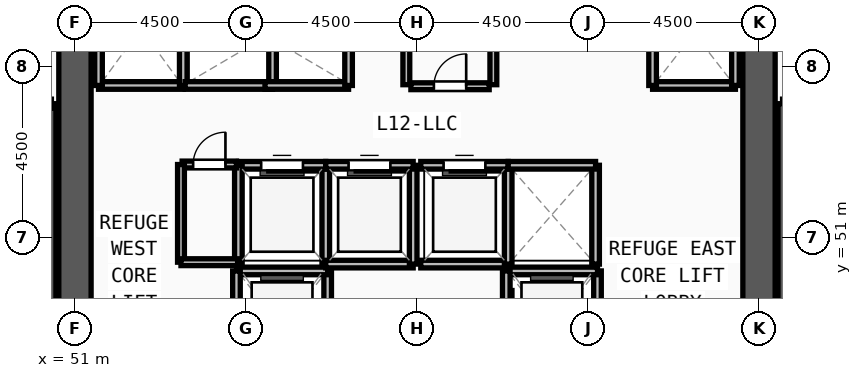
"""IFC4 building model, lengths in metres.
Left out: names, types, materials, properties, quantities, classifications, styles, units other than length and angle.
Written with IfcOpenShell. Run it as: python <this file> out.ifc"""

import sys

from ifc_helpers import new_model, si_unit, direction, frame, frame_2d, origin, place, context, subcontext, project, spatial, rectangle, extrude, source, transform, mapped, element, fill, save


model = new_model("IFC4")
c1 = context("Model", 3, precision=1e-05, world=origin(), true_north=direction((0.0, 1.0)))
c2 = subcontext(c1, "Body", "Model", "MODEL_VIEW")
j1 = project(units=[si_unit("LENGTHUNIT", "METRE"), si_unit("PLANEANGLEUNIT", "RADIAN")], contexts=[c1])
p1 = place(None, origin())
s1 = spatial("IfcSite", under=j1, at=p1, CompositionType="ELEMENT")
p2 = place(p1, origin())
s2 = spatial("IfcBuilding", under=s1, at=p2, CompositionType="ELEMENT")
p3 = place(p2, frame((0.0, 0.0, 47.25)))
s3 = spatial("IfcBuildingStorey", under=s2, at=p3, CompositionType="ELEMENT", Elevation=47.25)
p4 = place(p3, frame((69.0, 60.675, 0.0), z_axis=(0.0, 0.0, 1.0), x_axis=(0.0, -1.0, 0.0)))
e1 = element("IfcWall", 1, at=p4, inside=s3, PredefinedType="SHEAR", context=c2, shape_type="SweptSolid", body=[
    extrude(rectangle(XDim=13.35, YDim=0.85, at=frame_2d((6.675, 0.0))), origin(), (0.0, 0.0, 1.0), 4.32),
])
m1 = source(origin(), c2, "Body", "SweptSolid", [
    extrude(rectangle(XDim=1.2, YDim=2.2, at=frame_2d((0.6, 1.1))), frame((0.0, 0.435, 0.0), z_axis=(0.0, -1.0, 0.0), x_axis=(1.0, 0.0, 0.0)), (0.0, 0.0, 1.0), 0.87),
])
p5 = place(p4, frame((1.125, 0.0, 0.0)))
e2 = element("IfcOpeningElement", 2, at=p5, cuts=e1, PredefinedType="OPENING", context=c2, shape_type="MappedRepresentation", body=[
    mapped(m1, transform((0.0, 0.0, 0.0), x_axis=(1.0, 0.0, 0.0), y_axis=(0.0, 1.0, 0.0), z_axis=(0.0, 0.0, 1.0), scale=1.0)),
])
p6 = place(p3, frame((51.0, 47.325, 0.0), z_axis=(0.0, 0.0, 1.0), x_axis=(0.0, 1.0, 0.0)))
e3 = element("IfcWall", 3, at=p6, inside=s3, PredefinedType="SHEAR", context=c2, shape_type="SweptSolid", body=[
    extrude(rectangle(XDim=13.35, YDim=0.85, at=frame_2d((6.675, 0.0))), origin(), (0.0, 0.0, 1.0), 4.32),
])
for number, where, z_axis, x_axis in (
    (4, (50.38, 46.7, 0.0), (0.0, 0.0, 1.0), (0.0, 1.0, 0.0)),
    (5, (69.62, 54.52, 0.0), (0.0, 0.0, 1.0), (0.0, -1.0, 0.0)),
):
    element("IfcWall", number, at=place(p3, frame(where, z_axis=z_axis, x_axis=x_axis)), inside=s3, PredefinedType="SOLIDWALL", context=c2, shape_type="SweptSolid", body=[
        extrude(rectangle(XDim=7.82, YDim=0.24, at=frame_2d((3.91, 0.0))), origin(), (0.0, 0.0, 1.0), 4.32),
    ])
p7 = place(p3, frame((57.65, 47.12, 0.0), z_axis=(0.0, 0.0, 1.0), x_axis=(0.0, 1.0, 0.0)))
e6 = element("IfcWall", 6, at=p7, inside=s3, PredefinedType="SOLIDWALL", context=c2, shape_type="SweptSolid", body=[
    extrude(rectangle(XDim=3.0, YDim=0.2, at=frame_2d((1.5, 0.0))), origin(), (0.0, 0.0, 1.0), 4.32),
])
m2 = source(origin(), c2, "Body", "SweptSolid", [
    extrude(rectangle(XDim=1.2, YDim=2.3, at=frame_2d((0.6, 1.15))), frame((0.0, 0.11, 0.0), z_axis=(0.0, -1.0, 0.0), x_axis=(1.0, 0.0, 0.0)), (0.0, 0.0, 1.0), 0.22),
])
p8 = place(p7, frame((0.9, 0.0, 0.0)))
e7 = element("IfcOpeningElement", 7, at=p8, cuts=e6, PredefinedType="OPENING", context=c2, shape_type="MappedRepresentation", body=[
    mapped(m2, transform((0.0, 0.0, 0.0), x_axis=(1.0, 0.0, 0.0), y_axis=(0.0, 1.0, 0.0), z_axis=(0.0, 0.0, 1.0), scale=1.0)),
])
p9 = place(p3, frame((57.65, 50.12, 0.0), z_axis=(0.0, 0.0, 1.0), x_axis=(-1.0, 0.0, 0.0)))
e8 = element("IfcWall", 8, at=p9, inside=s3, PredefinedType="SOLIDWALL", context=c2, shape_type="SweptSolid", body=[
    extrude(rectangle(XDim=2.4, YDim=0.2, at=frame_2d((1.2, 0.0))), origin(), (0.0, 0.0, 1.0), 4.32),
])
for number, where, z_axis, x_axis in (
    (9, (55.25, 50.12, 0.0), (0.0, 0.0, 1.0), (0.0, -1.0, 0.0)),
    (10, (64.75, 47.12, 0.0), (0.0, 0.0, 1.0), (0.0, 1.0, 0.0)),
):
    element("IfcWall", number, at=place(p3, frame(where, z_axis=z_axis, x_axis=x_axis)), inside=s3, PredefinedType="SOLIDWALL", context=c2, shape_type="SweptSolid", body=[
        extrude(rectangle(XDim=3.0, YDim=0.2, at=frame_2d((1.5, 0.0))), origin(), (0.0, 0.0, 1.0), 4.32),
    ])
p10 = place(p3, frame((64.75, 50.12, 0.0), z_axis=(0.0, 0.0, 1.0), x_axis=(-1.0, 0.0, 0.0)))
e11 = element("IfcWall", 11, at=p10, inside=s3, PredefinedType="SOLIDWALL", context=c2, shape_type="SweptSolid", body=[
    extrude(rectangle(XDim=2.4, YDim=0.2, at=frame_2d((1.2, 0.0))), origin(), (0.0, 0.0, 1.0), 4.32),
])
p11 = place(p3, frame((62.35, 50.12, 0.0), z_axis=(0.0, 0.0, 1.0), x_axis=(0.0, -1.0, 0.0)))
e12 = element("IfcWall", 12, at=p11, inside=s3, PredefinedType="SOLIDWALL", context=c2, shape_type="SweptSolid", body=[
    extrude(rectangle(XDim=3.0, YDim=0.2, at=frame_2d((1.5, 0.0))), origin(), (0.0, 0.0, 1.0), 4.32),
])
p12 = place(p11, frame((0.9, 0.0, 0.0)))
e13 = element("IfcOpeningElement", 13, at=p12, cuts=e12, PredefinedType="OPENING", context=c2, shape_type="MappedRepresentation", body=[
    mapped(m2, transform((0.0, 0.0, 0.0), x_axis=(1.0, 0.0, 0.0), y_axis=(0.0, 1.0, 0.0), z_axis=(0.0, 0.0, 1.0), scale=1.0)),
])
p13 = place(p3, frame((51.62, 55.0, 0.0), z_axis=(0.0, 0.0, 1.0), x_axis=(1.0, 0.0, 0.0)))
e14 = element("IfcWall", 14, at=p13, inside=s3, PredefinedType="SOLIDWALL", context=c2, shape_type="SweptSolid", body=[
    extrude(rectangle(XDim=2.23, YDim=0.2, at=frame_2d((1.115, 0.0))), origin(), (0.0, 0.0, 1.0), 4.32),
])
for number, where, z_axis, x_axis in (
    (15, (53.85, 55.0, 0.0), (0.0, 0.0, 1.0), (0.0, 1.0, 0.0)),
    (16, (51.62, 58.0, 0.0), (0.0, 0.0, 1.0), (0.0, -1.0, 0.0)),
):
    element("IfcWall", number, at=place(p3, frame(where, z_axis=z_axis, x_axis=x_axis)), inside=s3, PredefinedType="SOLIDWALL", context=c2, shape_type="SweptSolid", body=[
        extrude(rectangle(XDim=3.0, YDim=0.2, at=frame_2d((1.5, 0.0))), origin(), (0.0, 0.0, 1.0), 4.32),
    ])
p14 = place(p3, frame((66.2, 55.0, 0.0), z_axis=(0.0, 0.0, 1.0), x_axis=(1.0, 0.0, 0.0)))
e17 = element("IfcWall", 17, at=p14, inside=s3, PredefinedType="SOLIDWALL", context=c2, shape_type="SweptSolid", body=[
    extrude(rectangle(XDim=2.18, YDim=0.2, at=frame_2d((1.09, 0.0))), origin(), (0.0, 0.0, 1.0), 4.32),
])
for number, where, z_axis, x_axis in (
    (18, (68.38, 55.0, 0.0), (0.0, 0.0, 1.0), (0.0, 1.0, 0.0)),
    (19, (66.2, 57.75, 0.0), (0.0, 0.0, 1.0), (0.0, -1.0, 0.0)),
):
    element("IfcWall", number, at=place(p3, frame(where, z_axis=z_axis, x_axis=x_axis)), inside=s3, PredefinedType="SOLIDWALL", context=c2, shape_type="SweptSolid", body=[
        extrude(rectangle(XDim=2.75, YDim=0.2, at=frame_2d((1.375, 0.0))), origin(), (0.0, 0.0, 1.0), 4.32),
    ])
p15 = place(p3, frame((57.6, 50.3, 0.0), z_axis=(0.0, 0.0, 1.0), x_axis=(0.0, 1.0, 0.0)))
e20 = element("IfcWall", 20, at=p15, inside=s3, PredefinedType="SOLIDWALL", context=c2, shape_type="SweptSolid", body=[
    extrude(rectangle(XDim=2.6, YDim=0.2, at=frame_2d((1.3, 0.0))), origin(), (0.0, 0.0, 1.0), 4.32),
])
p16 = place(p3, frame((57.6, 52.9, 0.0), z_axis=(0.0, 0.0, 1.0), x_axis=(-1.0, 0.0, 0.0)))
e21 = element("IfcWall", 21, at=p16, inside=s3, PredefinedType="SOLIDWALL", context=c2, shape_type="SweptSolid", body=[
    extrude(rectangle(XDim=2.3, YDim=0.2, at=frame_2d((1.15, 0.0))), origin(), (0.0, 0.0, 1.0), 4.32),
])
m3 = source(origin(), c2, "Body", "SweptSolid", [
    extrude(rectangle(XDim=1.1, YDim=2.2, at=frame_2d((0.55, 1.1))), frame((0.0, 0.11, 0.0), z_axis=(0.0, -1.0, 0.0), x_axis=(1.0, 0.0, 0.0)), (0.0, 0.0, 1.0), 0.22),
])
p17 = place(p16, frame((0.6, 0.0, 0.0)))
e22 = element("IfcOpeningElement", 22, at=p17, cuts=e21, PredefinedType="OPENING", context=c2, shape_type="MappedRepresentation", body=[
    mapped(m3, transform((0.0, 0.0, 0.0), x_axis=(1.0, 0.0, 0.0), y_axis=(0.0, 1.0, 0.0), z_axis=(0.0, 0.0, 1.0), scale=1.0)),
])
p18 = place(p3, frame((55.3, 52.9, 0.0), z_axis=(0.0, 0.0, 1.0), x_axis=(0.0, -1.0, 0.0)))
e23 = element("IfcWall", 23, at=p18, inside=s3, PredefinedType="SOLIDWALL", context=c2, shape_type="SweptSolid", body=[
    extrude(rectangle(XDim=2.6, YDim=0.2, at=frame_2d((1.3, 0.0))), origin(), (0.0, 0.0, 1.0), 4.32),
])
p19 = place(p3, frame((57.6, 50.3, 0.0), z_axis=(0.0, 0.0, 1.0), x_axis=(1.0, 0.0, 0.0)))
e24 = element("IfcWall", 24, at=p19, inside=s3, PredefinedType="SOLIDWALL", context=c2, shape_type="SweptSolid", body=[
    extrude(rectangle(XDim=2.3, YDim=0.2, at=frame_2d((1.15, 0.0))), origin(), (0.0, 0.0, 1.0), 4.32),
])
p20 = place(p3, frame((59.9, 50.3, 0.0), z_axis=(0.0, 0.0, 1.0), x_axis=(0.0, 1.0, 0.0)))
e25 = element("IfcWall", 25, at=p20, inside=s3, PredefinedType="SOLIDWALL", context=c2, shape_type="SweptSolid", body=[
    extrude(rectangle(XDim=2.6, YDim=0.2, at=frame_2d((1.3, 0.0))), origin(), (0.0, 0.0, 1.0), 4.32),
])
p21 = place(p3, frame((59.9, 52.9, 0.0), z_axis=(0.0, 0.0, 1.0), x_axis=(-1.0, 0.0, 0.0)))
e26 = element("IfcWall", 26, at=p21, inside=s3, PredefinedType="SOLIDWALL", context=c2, shape_type="SweptSolid", body=[
    extrude(rectangle(XDim=2.3, YDim=0.2, at=frame_2d((1.15, 0.0))), origin(), (0.0, 0.0, 1.0), 4.32),
])
p22 = place(p21, frame((0.6, 0.0, 0.0)))
e27 = element("IfcOpeningElement", 27, at=p22, cuts=e26, PredefinedType="OPENING", context=c2, shape_type="MappedRepresentation", body=[
    mapped(m3, transform((0.0, 0.0, 0.0), x_axis=(1.0, 0.0, 0.0), y_axis=(0.0, 1.0, 0.0), z_axis=(0.0, 0.0, 1.0), scale=1.0)),
])
p23 = place(p3, frame((60.1, 50.3, 0.0), z_axis=(0.0, 0.0, 1.0), x_axis=(1.0, 0.0, 0.0)))
e28 = element("IfcWall", 28, at=p23, inside=s3, PredefinedType="SOLIDWALL", context=c2, shape_type="SweptSolid", body=[
    extrude(rectangle(XDim=2.3, YDim=0.2, at=frame_2d((1.15, 0.0))), origin(), (0.0, 0.0, 1.0), 4.32),
])
p24 = place(p3, frame((62.4, 50.3, 0.0), z_axis=(0.0, 0.0, 1.0), x_axis=(0.0, 1.0, 0.0)))
e29 = element("IfcWall", 29, at=p24, inside=s3, PredefinedType="SOLIDWALL", context=c2, shape_type="SweptSolid", body=[
    extrude(rectangle(XDim=2.6, YDim=0.2, at=frame_2d((1.3, 0.0))), origin(), (0.0, 0.0, 1.0), 4.32),
])
p25 = place(p3, frame((62.4, 52.9, 0.0), z_axis=(0.0, 0.0, 1.0), x_axis=(-1.0, 0.0, 0.0)))
e30 = element("IfcWall", 30, at=p25, inside=s3, PredefinedType="SOLIDWALL", context=c2, shape_type="SweptSolid", body=[
    extrude(rectangle(XDim=2.3, YDim=0.2, at=frame_2d((1.15, 0.0))), origin(), (0.0, 0.0, 1.0), 4.32),
])
p26 = place(p25, frame((0.6, 0.0, 0.0)))
e31 = element("IfcOpeningElement", 31, at=p26, cuts=e30, PredefinedType="OPENING", context=c2, shape_type="MappedRepresentation", body=[
    mapped(m3, transform((0.0, 0.0, 0.0), x_axis=(1.0, 0.0, 0.0), y_axis=(0.0, 1.0, 0.0), z_axis=(0.0, 0.0, 1.0), scale=1.0)),
])
p27 = place(p3, frame((64.7, 50.3, 0.0), z_axis=(0.0, 0.0, 1.0), x_axis=(0.0, 1.0, 0.0)))
e32 = element("IfcWall", 32, at=p27, inside=s3, PredefinedType="SOLIDWALL", context=c2, shape_type="SweptSolid", body=[
    extrude(rectangle(XDim=2.6, YDim=0.2, at=frame_2d((1.3, 0.0))), origin(), (0.0, 0.0, 1.0), 4.32),
])
for number, where, z_axis, x_axis in (
    (33, (64.7, 52.9, 0.0), (0.0, 0.0, 1.0), (-1.0, 0.0, 0.0)),
    (34, (53.9, 55.0, 0.0), (0.0, 0.0, 1.0), (1.0, 0.0, 0.0)),
):
    element("IfcWall", number, at=place(p3, frame(where, z_axis=z_axis, x_axis=x_axis)), inside=s3, PredefinedType="SOLIDWALL", context=c2, shape_type="SweptSolid", body=[
        extrude(rectangle(XDim=2.3, YDim=0.2, at=frame_2d((1.15, 0.0))), origin(), (0.0, 0.0, 1.0), 4.32),
    ])
p28 = place(p3, frame((56.2, 55.0, 0.0), z_axis=(0.0, 0.0, 1.0), x_axis=(0.0, 1.0, 0.0)))
e35 = element("IfcWall", 35, at=p28, inside=s3, PredefinedType="SOLIDWALL", context=c2, shape_type="SweptSolid", body=[
    extrude(rectangle(XDim=2.6, YDim=0.2, at=frame_2d((1.3, 0.0))), origin(), (0.0, 0.0, 1.0), 4.32),
])
p29 = place(p3, frame((56.0, 55.0, 0.0), z_axis=(0.0, 0.0, 1.0), x_axis=(1.0, 0.0, 0.0)))
e36 = element("IfcWall", 36, at=p29, inside=s3, PredefinedType="SOLIDWALL", context=c2, shape_type="SweptSolid", body=[
    extrude(rectangle(XDim=2.2, YDim=0.2, at=frame_2d((1.1, 0.0))), origin(), (0.0, 0.0, 1.0), 4.32),
])
p30 = place(p3, frame((58.2, 55.0, 0.0), z_axis=(0.0, 0.0, 1.0), x_axis=(0.0, 1.0, 0.0)))
e37 = element("IfcWall", 37, at=p30, inside=s3, PredefinedType="SOLIDWALL", context=c2, shape_type="SweptSolid", body=[
    extrude(rectangle(XDim=2.6, YDim=0.2, at=frame_2d((1.3, 0.0))), origin(), (0.0, 0.0, 1.0), 4.32),
])
p31 = place(p3, frame((59.84, 54.98, 0.0), z_axis=(0.0, 0.0, 1.0), x_axis=(1.0, 0.0, 0.0)))
e38 = element("IfcWall", 38, at=p31, inside=s3, PredefinedType="PARTITIONING", context=c2, shape_type="SweptSolid", body=[
    extrude(rectangle(XDim=2.06, YDim=0.18, at=frame_2d((1.03, 0.0))), origin(), (0.0, 0.0, 1.0), 4.32),
])
m4 = source(origin(), c2, "Body", "SweptSolid", [
    extrude(rectangle(XDim=0.85, YDim=2.1, at=frame_2d((0.425, 1.05))), frame((0.0, 0.1, 0.0), z_axis=(0.0, -1.0, 0.0), x_axis=(1.0, 0.0, 0.0)), (0.0, 0.0, 1.0), 0.2),
])
p32 = place(p31, frame((0.605, 0.0, 0.0)))
e39 = element("IfcOpeningElement", 39, at=p32, cuts=e38, PredefinedType="OPENING", context=c2, shape_type="MappedRepresentation", body=[
    mapped(m4, transform((0.0, 0.0, 0.0), x_axis=(1.0, 0.0, 0.0), y_axis=(0.0, 1.0, 0.0), z_axis=(0.0, 0.0, 1.0), scale=1.0)),
])
p33 = place(p3, frame((53.82, 52.92, 0.0), z_axis=(0.0, 0.0, 1.0), x_axis=(1.0, 0.0, 0.0)))
e40 = element("IfcWall", 40, at=p33, inside=s3, PredefinedType="PARTITIONING", context=c2, shape_type="SweptSolid", body=[
    extrude(rectangle(XDim=1.43, YDim=0.18, at=frame_2d((0.715, 0.0))), origin(), (0.0, 0.0, 1.0), 4.32),
])
p34 = place(p33, frame((0.29, 0.0, 0.0)))
e41 = element("IfcOpeningElement", 41, at=p34, cuts=e40, PredefinedType="OPENING", context=c2, shape_type="MappedRepresentation", body=[
    mapped(m4, transform((0.0, 0.0, 0.0), x_axis=(1.0, 0.0, 0.0), y_axis=(0.0, 1.0, 0.0), z_axis=(0.0, 0.0, 1.0), scale=1.0)),
])
for number, where, z_axis, x_axis in (
    (42, (59.72, 55.02, 0.0), (0.0, 0.0, 1.0), (0.0, 1.0, 0.0)),
    (43, (62.01, 55.02, 0.0), (0.0, 0.0, 1.0), (0.0, 1.0, 0.0)),
):
    element("IfcWall", number, at=place(p3, frame(where, z_axis=z_axis, x_axis=x_axis)), inside=s3, PredefinedType="PARTITIONING", context=c2, shape_type="SweptSolid", body=[
        extrude(rectangle(XDim=2.88, YDim=0.18, at=frame_2d((1.44, 0.0))), origin(), (0.0, 0.0, 1.0), 4.32),
    ])
p35 = place(p3, frame((53.79, 50.35, 0.0), z_axis=(0.0, 0.0, 1.0), x_axis=(0.0, 1.0, 0.0)))
e44 = element("IfcWall", 44, at=p35, inside=s3, PredefinedType="PARTITIONING", context=c2, shape_type="SweptSolid", body=[
    extrude(rectangle(XDim=2.57, YDim=0.18, at=frame_2d((1.285, 0.0))), origin(), (0.0, 0.0, 1.0), 4.32),
])
p36 = place(p3, frame((53.79, 50.35, 0.0), z_axis=(0.0, 0.0, 1.0), x_axis=(1.0, 0.0, 0.0)))
e45 = element("IfcWall", 45, at=p36, inside=s3, PredefinedType="PARTITIONING", context=c2, shape_type="SweptSolid", body=[
    extrude(rectangle(XDim=1.49, YDim=0.18, at=frame_2d((0.745, 0.0))), origin(), (0.0, 0.0, 1.0), 4.32),
])
m5 = source(origin(), c2, "Body", "SweptSolid", [
    extrude(rectangle(XDim=1.1, YDim=2.2, at=frame_2d((0.55, 1.1))), frame((0.0, 0.025, 0.0), z_axis=(0.0, -1.0, 0.0), x_axis=(1.0, 0.0, 0.0)), (0.0, 0.0, 1.0), 0.05),
])
p37 = place(p17, origin())
e46 = element("IfcDoor", 46, at=p37, inside=s3, OperationType="SLIDING_TO_LEFT", PredefinedType="DOOR", context=c2, shape_type="MappedRepresentation", body=[
    mapped(m5, transform((0.0, 0.0, 0.0), x_axis=(1.0, 0.0, 0.0), y_axis=(0.0, 1.0, 0.0), z_axis=(0.0, 0.0, 1.0), scale=1.0)),
])
fill(e22, e46)
p38 = place(p22, origin())
e47 = element("IfcDoor", 47, at=p38, inside=s3, OperationType="SLIDING_TO_LEFT", PredefinedType="DOOR", context=c2, shape_type="MappedRepresentation", body=[
    mapped(m5, transform((0.0, 0.0, 0.0), x_axis=(1.0, 0.0, 0.0), y_axis=(0.0, 1.0, 0.0), z_axis=(0.0, 0.0, 1.0), scale=1.0)),
])
fill(e27, e47)
p39 = place(p26, origin())
e48 = element("IfcDoor", 48, at=p39, inside=s3, OperationType="SLIDING_TO_LEFT", PredefinedType="DOOR", context=c2, shape_type="MappedRepresentation", body=[
    mapped(m5, transform((0.0, 0.0, 0.0), x_axis=(1.0, 0.0, 0.0), y_axis=(0.0, 1.0, 0.0), z_axis=(0.0, 0.0, 1.0), scale=1.0)),
])
fill(e31, e48)
m6 = source(origin(), c2, "Body", "SweptSolid", [
    extrude(rectangle(XDim=0.85, YDim=2.1, at=frame_2d((0.425, 1.05))), frame((0.0, 0.025, 0.0), z_axis=(0.0, -1.0, 0.0), x_axis=(1.0, 0.0, 0.0)), (0.0, 0.0, 1.0), 0.05),
])
p40 = place(p32, origin())
e49 = element("IfcDoor", 49, at=p40, inside=s3, OperationType="SINGLE_SWING_RIGHT", PredefinedType="DOOR", context=c2, shape_type="MappedRepresentation", body=[
    mapped(m6, transform((0.0, 0.0, 0.0), x_axis=(1.0, 0.0, 0.0), y_axis=(0.0, 1.0, 0.0), z_axis=(0.0, 0.0, 1.0), scale=1.0)),
])
fill(e39, e49)
p41 = place(p34, origin())
e50 = element("IfcDoor", 50, at=p41, inside=s3, OperationType="SINGLE_SWING_RIGHT", PredefinedType="DOOR", context=c2, shape_type="MappedRepresentation", body=[
    mapped(m6, transform((0.0, 0.0, 0.0), x_axis=(1.0, 0.0, 0.0), y_axis=(0.0, 1.0, 0.0), z_axis=(0.0, 0.0, 1.0), scale=1.0)),
])
fill(e41, e50)
save(model, sys.argv[1])
